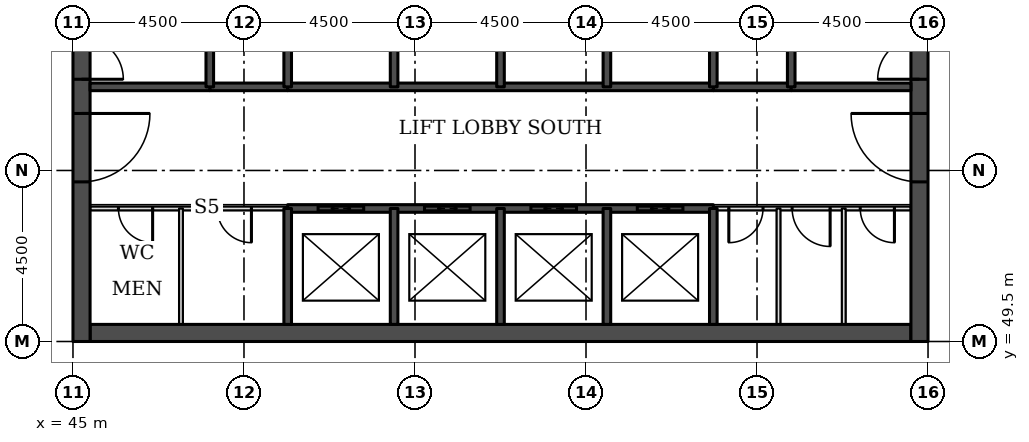
"""IFC4 building model, lengths in metres.
Left out: names, types, materials, properties, quantities, classifications, styles, units other than length and angle.
Written with IfcOpenShell. Run it as: python <this file> out.ifc"""

import sys

from ifc_helpers import new_model, si_unit, direction, frame, frame_2d, origin, place, context, subcontext, project, spatial, rectangle, extrude, element, fill, save


model = new_model("IFC4")
c1 = context("Model", 3, precision=1e-05, world=origin(), true_north=direction((0.0, 1.0)))
c2 = subcontext(c1, "Body", "Model", "MODEL_VIEW")
j1 = project(units=[si_unit("LENGTHUNIT", "METRE"), si_unit("PLANEANGLEUNIT", "RADIAN")], contexts=[c1])
p1 = place(None, origin())
s1 = spatial("IfcSite", under=j1, at=p1, CompositionType="ELEMENT")
p2 = place(p1, origin())
s2 = spatial("IfcBuilding", under=s1, at=p2, CompositionType="ELEMENT")
p3 = place(p2, frame((0.0, 0.0, 93.7)))
s3 = spatial("IfcBuildingStorey", under=s2, at=p3, CompositionType="ELEMENT", Elevation=93.7)
p4 = place(p3, frame((45.45, 49.725, 0.0), z_axis=(0.0, 0.0, 1.0), x_axis=(1.0, 0.0, 0.0)))
e1 = element("IfcWall", 1, at=p4, inside=s3, PredefinedType="SHEAR", context=c2, shape_type="SweptSolid", body=[
    extrude(rectangle(XDim=21.6, YDim=0.45, at=frame_2d((10.8, 0.0))), origin(), (0.0, 0.0, 1.0), 3.7),
])
p5 = place(p3, frame((45.225, 49.5, 0.0), z_axis=(0.0, 0.0, 1.0), x_axis=(0.0, 1.0, 0.0)))
e2 = element("IfcWall", 2, at=p5, inside=s3, PredefinedType="SHEAR", context=c2, shape_type="SweptSolid", body=[
    extrude(rectangle(XDim=22.5, YDim=0.45, at=frame_2d((11.25, 0.0))), origin(), (0.0, 0.0, 1.0), 3.7),
])
p6 = place(p5, frame((4.2, 0.0, 0.0)))
e3 = element("IfcOpeningElement", 3, at=p6, cuts=e2, PredefinedType="OPENING", context=c2, shape_type="SweptSolid", body=[
    extrude(rectangle(XDim=1.8, YDim=2.1, at=frame_2d((0.9, 1.05))), frame((0.0, 0.235, 0.0), z_axis=(0.0, -1.0, 0.0), x_axis=(1.0, 0.0, 0.0)), (0.0, 0.0, 1.0), 0.47),
])
p7 = place(p5, frame((6.9, 0.0, 0.0)))
e4 = element("IfcOpeningElement", 4, at=p7, cuts=e2, PredefinedType="OPENING", context=c2, shape_type="SweptSolid", body=[
    extrude(rectangle(XDim=1.1, YDim=2.1, at=frame_2d((0.55, 1.05))), frame((0.0, 0.235, 0.0), z_axis=(0.0, -1.0, 0.0), x_axis=(1.0, 0.0, 0.0)), (0.0, 0.0, 1.0), 0.47),
])
p8 = place(p5, frame((13.6, 0.0, 0.0)))
e5 = element("IfcOpeningElement", 5, at=p8, cuts=e2, PredefinedType="OPENING", context=c2, shape_type="SweptSolid", body=[
    extrude(rectangle(XDim=1.1, YDim=2.1, at=frame_2d((0.55, 1.05))), frame((0.0, 0.235, 0.0), z_axis=(0.0, -1.0, 0.0), x_axis=(1.0, 0.0, 0.0)), (0.0, 0.0, 1.0), 0.47),
])
p9 = place(p5, frame((16.5, 0.0, 0.0)))
e6 = element("IfcOpeningElement", 6, at=p9, cuts=e2, PredefinedType="OPENING", context=c2, shape_type="SweptSolid", body=[
    extrude(rectangle(XDim=1.8, YDim=2.1, at=frame_2d((0.9, 1.05))), frame((0.0, 0.235, 0.0), z_axis=(0.0, -1.0, 0.0), x_axis=(1.0, 0.0, 0.0)), (0.0, 0.0, 1.0), 0.47),
])
p10 = place(p3, frame((67.275, 49.5, 0.0), z_axis=(0.0, 0.0, 1.0), x_axis=(0.0, 1.0, 0.0)))
e7 = element("IfcWall", 7, at=p10, inside=s3, PredefinedType="SHEAR", context=c2, shape_type="SweptSolid", body=[
    extrude(rectangle(XDim=22.5, YDim=0.45, at=frame_2d((11.25, 0.0))), origin(), (0.0, 0.0, 1.0), 3.7),
])
p11 = place(p10, frame((4.2, 0.0, 0.0)))
e8 = element("IfcOpeningElement", 8, at=p11, cuts=e7, PredefinedType="OPENING", context=c2, shape_type="SweptSolid", body=[
    extrude(rectangle(XDim=1.8, YDim=2.1, at=frame_2d((0.9, 1.05))), frame((0.0, 0.235, 0.0), z_axis=(0.0, -1.0, 0.0), x_axis=(1.0, 0.0, 0.0)), (0.0, 0.0, 1.0), 0.47),
])
p12 = place(p10, frame((6.9, 0.0, 0.0)))
e9 = element("IfcOpeningElement", 9, at=p12, cuts=e7, PredefinedType="OPENING", context=c2, shape_type="SweptSolid", body=[
    extrude(rectangle(XDim=1.1, YDim=2.1, at=frame_2d((0.55, 1.05))), frame((0.0, 0.235, 0.0), z_axis=(0.0, -1.0, 0.0), x_axis=(1.0, 0.0, 0.0)), (0.0, 0.0, 1.0), 0.47),
])
p13 = place(p10, frame((13.6, 0.0, 0.0)))
e10 = element("IfcOpeningElement", 10, at=p13, cuts=e7, PredefinedType="OPENING", context=c2, shape_type="SweptSolid", body=[
    extrude(rectangle(XDim=1.1, YDim=2.1, at=frame_2d((0.55, 1.05))), frame((0.0, 0.235, 0.0), z_axis=(0.0, -1.0, 0.0), x_axis=(1.0, 0.0, 0.0)), (0.0, 0.0, 1.0), 0.47),
])
p14 = place(p10, frame((16.5, 0.0, 0.0)))
e11 = element("IfcOpeningElement", 11, at=p14, cuts=e7, PredefinedType="OPENING", context=c2, shape_type="SweptSolid", body=[
    extrude(rectangle(XDim=1.8, YDim=2.1, at=frame_2d((0.9, 1.05))), frame((0.0, 0.235, 0.0), z_axis=(0.0, -1.0, 0.0), x_axis=(1.0, 0.0, 0.0)), (0.0, 0.0, 1.0), 0.47),
])
p15 = place(p3, frame((45.45, 53.0, 0.0), z_axis=(0.0, 0.0, 1.0), x_axis=(1.0, 0.0, 0.0)))
e12 = element("IfcWall", 12, at=p15, inside=s3, PredefinedType="PARTITIONING", context=c2, shape_type="SweptSolid", body=[
    extrude(rectangle(XDim=5.2, YDim=0.1, at=frame_2d((2.6, 0.0))), origin(), (0.0, 0.0, 1.0), 3.55),
])
p16 = place(p15, frame((0.746, 0.0, 0.0)))
e13 = element("IfcOpeningElement", 13, at=p16, cuts=e12, PredefinedType="OPENING", context=c2, shape_type="SweptSolid", body=[
    extrude(rectangle(XDim=0.9, YDim=2.1, at=frame_2d((0.45, 1.05))), frame((0.0, 0.06, 0.0), z_axis=(0.0, -1.0, 0.0), x_axis=(1.0, 0.0, 0.0)), (0.0, 0.0, 1.0), 0.12),
])
p17 = place(p15, frame((3.346, 0.0, 0.0)))
e14 = element("IfcOpeningElement", 14, at=p17, cuts=e12, PredefinedType="OPENING", context=c2, shape_type="SweptSolid", body=[
    extrude(rectangle(XDim=0.9, YDim=2.1, at=frame_2d((0.45, 1.05))), frame((0.0, 0.06, 0.0), z_axis=(0.0, -1.0, 0.0), x_axis=(1.0, 0.0, 0.0)), (0.0, 0.0, 1.0), 0.12),
])
p18 = place(p3, frame((61.85, 53.0, 0.0), z_axis=(0.0, 0.0, 1.0), x_axis=(1.0, 0.0, 0.0)))
e15 = element("IfcWall", 15, at=p18, inside=s3, PredefinedType="PARTITIONING", context=c2, shape_type="SweptSolid", body=[
    extrude(rectangle(XDim=5.2, YDim=0.1, at=frame_2d((2.6, 0.0))), origin(), (0.0, 0.0, 1.0), 3.55),
])
p19 = place(p18, frame((3.866, 0.0, 0.0)))
e16 = element("IfcOpeningElement", 16, at=p19, cuts=e15, PredefinedType="OPENING", context=c2, shape_type="SweptSolid", body=[
    extrude(rectangle(XDim=0.9, YDim=2.1, at=frame_2d((0.45, 1.05))), frame((0.0, 0.06, 0.0), z_axis=(0.0, -1.0, 0.0), x_axis=(1.0, 0.0, 0.0)), (0.0, 0.0, 1.0), 0.12),
])
p20 = place(p18, frame((2.074, 0.0, 0.0)))
e17 = element("IfcOpeningElement", 17, at=p20, cuts=e15, PredefinedType="OPENING", context=c2, shape_type="SweptSolid", body=[
    extrude(rectangle(XDim=1.0, YDim=2.1, at=frame_2d((0.5, 1.05))), frame((0.0, 0.06, 0.0), z_axis=(0.0, -1.0, 0.0), x_axis=(1.0, 0.0, 0.0)), (0.0, 0.0, 1.0), 0.12),
])
p21 = place(p18, frame((0.408, 0.0, 0.0)))
e18 = element("IfcOpeningElement", 18, at=p21, cuts=e15, PredefinedType="OPENING", context=c2, shape_type="SweptSolid", body=[
    extrude(rectangle(XDim=0.9, YDim=2.1, at=frame_2d((0.45, 1.05))), frame((0.0, 0.06, 0.0), z_axis=(0.0, -1.0, 0.0), x_axis=(1.0, 0.0, 0.0)), (0.0, 0.0, 1.0), 0.12),
])
p22 = place(p3, frame((50.65, 53.0, 0.0), z_axis=(0.0, 0.0, 1.0), x_axis=(1.0, 0.0, 0.0)))
e19 = element("IfcWall", 19, at=p22, inside=s3, PredefinedType="SOLIDWALL", context=c2, shape_type="SweptSolid", body=[
    extrude(rectangle(XDim=11.2, YDim=0.2, at=frame_2d((5.6, 0.0))), origin(), (0.0, 0.0, 1.0), 3.55),
])
p23 = place(p22, frame((0.8, 0.0, 0.0)))
e20 = element("IfcOpeningElement", 20, at=p23, cuts=e19, PredefinedType="OPENING", context=c2, shape_type="SweptSolid", body=[
    extrude(rectangle(XDim=1.2, YDim=2.1, at=frame_2d((0.6, 1.05))), frame((0.0, 0.11, 0.0), z_axis=(0.0, -1.0, 0.0), x_axis=(1.0, 0.0, 0.0)), (0.0, 0.0, 1.0), 0.22),
])
p24 = place(p22, frame((3.6, 0.0, 0.0)))
e21 = element("IfcOpeningElement", 21, at=p24, cuts=e19, PredefinedType="OPENING", context=c2, shape_type="SweptSolid", body=[
    extrude(rectangle(XDim=1.2, YDim=2.1, at=frame_2d((0.6, 1.05))), frame((0.0, 0.11, 0.0), z_axis=(0.0, -1.0, 0.0), x_axis=(1.0, 0.0, 0.0)), (0.0, 0.0, 1.0), 0.22),
])
p25 = place(p22, frame((6.4, 0.0, 0.0)))
e22 = element("IfcOpeningElement", 22, at=p25, cuts=e19, PredefinedType="OPENING", context=c2, shape_type="SweptSolid", body=[
    extrude(rectangle(XDim=1.2, YDim=2.1, at=frame_2d((0.6, 1.05))), frame((0.0, 0.11, 0.0), z_axis=(0.0, -1.0, 0.0), x_axis=(1.0, 0.0, 0.0)), (0.0, 0.0, 1.0), 0.22),
])
p26 = place(p22, frame((9.2, 0.0, 0.0)))
e23 = element("IfcOpeningElement", 23, at=p26, cuts=e19, PredefinedType="OPENING", context=c2, shape_type="SweptSolid", body=[
    extrude(rectangle(XDim=1.2, YDim=2.1, at=frame_2d((0.6, 1.05))), frame((0.0, 0.11, 0.0), z_axis=(0.0, -1.0, 0.0), x_axis=(1.0, 0.0, 0.0)), (0.0, 0.0, 1.0), 0.22),
])
for number, where, z_axis, x_axis in (
    (24, (48.6, 56.2, 0.0), (0.0, 0.0, 1.0), (1.0, 0.0, 0.0)),
    (25, (61.85, 56.2, 0.0), (0.0, 0.0, 1.0), (1.0, 0.0, 0.0)),
):
    element("IfcWall", number, at=place(p3, frame(where, z_axis=z_axis, x_axis=x_axis)), inside=s3, PredefinedType="SOLIDWALL", context=c2, shape_type="SweptSolid", body=[
        extrude(rectangle(XDim=2.05, YDim=0.2, at=frame_2d((1.025, 0.0))), origin(), (0.0, 0.0, 1.0), 3.55),
    ])
p27 = place(p3, frame((45.45, 56.2, 0.0), z_axis=(0.0, 0.0, 1.0), x_axis=(1.0, 0.0, 0.0)))
e26 = element("IfcWall", 26, at=p27, inside=s3, PredefinedType="SOLIDWALL", context=c2, shape_type="SweptSolid", body=[
    extrude(rectangle(XDim=3.15, YDim=0.2, at=frame_2d((1.575, 0.0))), origin(), (0.0, 0.0, 1.0), 3.55),
])
p28 = place(p3, frame((50.65, 56.2, 0.0), z_axis=(0.0, 0.0, 1.0), x_axis=(1.0, 0.0, 0.0)))
e27 = element("IfcWall", 27, at=p28, inside=s3, PredefinedType="SOLIDWALL", context=c2, shape_type="SweptSolid", body=[
    extrude(rectangle(XDim=11.2, YDim=0.2, at=frame_2d((5.6, 0.0))), origin(), (0.0, 0.0, 1.0), 3.55),
])
p29 = place(p3, frame((63.9, 56.2, 0.0), z_axis=(0.0, 0.0, 1.0), x_axis=(1.0, 0.0, 0.0)))
e28 = element("IfcWall", 28, at=p29, inside=s3, PredefinedType="SOLIDWALL", context=c2, shape_type="SweptSolid", body=[
    extrude(rectangle(XDim=3.15, YDim=0.2, at=frame_2d((1.575, 0.0))), origin(), (0.0, 0.0, 1.0), 3.55),
])
p30 = place(p3, frame((47.842, 49.95, 0.0), z_axis=(0.0, 0.0, 1.0), x_axis=(0.0, 1.0, 0.0)))
e29 = element("IfcWall", 29, at=p30, inside=s3, PredefinedType="PARTITIONING", context=c2, shape_type="SweptSolid", body=[
    extrude(rectangle(XDim=3.05, YDim=0.1, at=frame_2d((1.525, 0.0))), origin(), (0.0, 0.0, 1.0), 3.55),
])
p31 = place(p3, frame((48.6, 56.2, 0.0), z_axis=(0.0, 0.0, 1.0), x_axis=(0.0, 1.0, 0.0)))
e30 = element("IfcWall", 30, at=p31, inside=s3, PredefinedType="SOLIDWALL", context=c2, shape_type="SweptSolid", body=[
    extrude(rectangle(XDim=5.8, YDim=0.2, at=frame_2d((2.9, 0.0))), origin(), (0.0, 0.0, 1.0), 3.55),
])
p32 = place(p3, frame((50.65, 49.95, 0.0), z_axis=(0.0, 0.0, 1.0), x_axis=(0.0, 1.0, 0.0)))
e31 = element("IfcWall", 31, at=p32, inside=s3, PredefinedType="SOLIDWALL", context=c2, shape_type="SweptSolid", body=[
    extrude(rectangle(XDim=3.05, YDim=0.2, at=frame_2d((1.525, 0.0))), origin(), (0.0, 0.0, 1.0), 3.55),
])
p33 = place(p3, frame((50.65, 56.2, 0.0), z_axis=(0.0, 0.0, 1.0), x_axis=(0.0, 1.0, 0.0)))
e32 = element("IfcWall", 32, at=p33, inside=s3, PredefinedType="SOLIDWALL", context=c2, shape_type="SweptSolid", body=[
    extrude(rectangle(XDim=2.8, YDim=0.2, at=frame_2d((1.4, 0.0))), origin(), (0.0, 0.0, 1.0), 3.55),
])
p34 = place(p3, frame((53.45, 49.95, 0.0), z_axis=(0.0, 0.0, 1.0), x_axis=(0.0, 1.0, 0.0)))
e33 = element("IfcWall", 33, at=p34, inside=s3, PredefinedType="SOLIDWALL", context=c2, shape_type="SweptSolid", body=[
    extrude(rectangle(XDim=3.05, YDim=0.2, at=frame_2d((1.525, 0.0))), origin(), (0.0, 0.0, 1.0), 3.55),
])
p35 = place(p3, frame((53.45, 56.2, 0.0), z_axis=(0.0, 0.0, 1.0), x_axis=(0.0, 1.0, 0.0)))
e34 = element("IfcWall", 34, at=p35, inside=s3, PredefinedType="SOLIDWALL", context=c2, shape_type="SweptSolid", body=[
    extrude(rectangle(XDim=2.8, YDim=0.2, at=frame_2d((1.4, 0.0))), origin(), (0.0, 0.0, 1.0), 3.55),
])
p36 = place(p3, frame((56.25, 49.95, 0.0), z_axis=(0.0, 0.0, 1.0), x_axis=(0.0, 1.0, 0.0)))
e35 = element("IfcWall", 35, at=p36, inside=s3, PredefinedType="SOLIDWALL", context=c2, shape_type="SweptSolid", body=[
    extrude(rectangle(XDim=3.05, YDim=0.2, at=frame_2d((1.525, 0.0))), origin(), (0.0, 0.0, 1.0), 3.55),
])
p37 = place(p3, frame((56.25, 56.2, 0.0), z_axis=(0.0, 0.0, 1.0), x_axis=(0.0, 1.0, 0.0)))
e36 = element("IfcWall", 36, at=p37, inside=s3, PredefinedType="SOLIDWALL", context=c2, shape_type="SweptSolid", body=[
    extrude(rectangle(XDim=2.8, YDim=0.2, at=frame_2d((1.4, 0.0))), origin(), (0.0, 0.0, 1.0), 3.55),
])
p38 = place(p3, frame((59.05, 49.95, 0.0), z_axis=(0.0, 0.0, 1.0), x_axis=(0.0, 1.0, 0.0)))
e37 = element("IfcWall", 37, at=p38, inside=s3, PredefinedType="SOLIDWALL", context=c2, shape_type="SweptSolid", body=[
    extrude(rectangle(XDim=3.05, YDim=0.2, at=frame_2d((1.525, 0.0))), origin(), (0.0, 0.0, 1.0), 3.55),
])
p39 = place(p3, frame((59.05, 56.2, 0.0), z_axis=(0.0, 0.0, 1.0), x_axis=(0.0, 1.0, 0.0)))
e38 = element("IfcWall", 38, at=p39, inside=s3, PredefinedType="SOLIDWALL", context=c2, shape_type="SweptSolid", body=[
    extrude(rectangle(XDim=2.8, YDim=0.2, at=frame_2d((1.4, 0.0))), origin(), (0.0, 0.0, 1.0), 3.55),
])
p40 = place(p3, frame((61.85, 49.95, 0.0), z_axis=(0.0, 0.0, 1.0), x_axis=(0.0, 1.0, 0.0)))
e39 = element("IfcWall", 39, at=p40, inside=s3, PredefinedType="SOLIDWALL", context=c2, shape_type="SweptSolid", body=[
    extrude(rectangle(XDim=3.05, YDim=0.2, at=frame_2d((1.525, 0.0))), origin(), (0.0, 0.0, 1.0), 3.55),
])
p41 = place(p3, frame((61.85, 56.2, 0.0), z_axis=(0.0, 0.0, 1.0), x_axis=(0.0, 1.0, 0.0)))
e40 = element("IfcWall", 40, at=p41, inside=s3, PredefinedType="SOLIDWALL", context=c2, shape_type="SweptSolid", body=[
    extrude(rectangle(XDim=2.8, YDim=0.2, at=frame_2d((1.4, 0.0))), origin(), (0.0, 0.0, 1.0), 3.55),
])
p42 = place(p3, frame((63.566, 49.95, 0.0), z_axis=(0.0, 0.0, 1.0), x_axis=(0.0, 1.0, 0.0)))
e41 = element("IfcWall", 41, at=p42, inside=s3, PredefinedType="PARTITIONING", context=c2, shape_type="SweptSolid", body=[
    extrude(rectangle(XDim=3.05, YDim=0.1, at=frame_2d((1.525, 0.0))), origin(), (0.0, 0.0, 1.0), 3.55),
])
p43 = place(p3, frame((63.9, 56.2, 0.0), z_axis=(0.0, 0.0, 1.0), x_axis=(0.0, 1.0, 0.0)))
e42 = element("IfcWall", 42, at=p43, inside=s3, PredefinedType="SOLIDWALL", context=c2, shape_type="SweptSolid", body=[
    extrude(rectangle(XDim=5.8, YDim=0.2, at=frame_2d((2.9, 0.0))), origin(), (0.0, 0.0, 1.0), 3.55),
])
p44 = place(p3, frame((65.282, 49.95, 0.0), z_axis=(0.0, 0.0, 1.0), x_axis=(0.0, 1.0, 0.0)))
e43 = element("IfcWall", 43, at=p44, inside=s3, PredefinedType="PARTITIONING", context=c2, shape_type="SweptSolid", body=[
    extrude(rectangle(XDim=3.05, YDim=0.1, at=frame_2d((1.525, 0.0))), origin(), (0.0, 0.0, 1.0), 3.55),
])
p45 = place(p23, origin())
e44 = element("IfcDoor", 44, at=p45, inside=s3, OperationType="DOUBLE_DOOR_SLIDING", PredefinedType="DOOR", context=c2, shape_type="SweptSolid", body=[
    extrude(rectangle(XDim=1.2, YDim=2.1, at=frame_2d((0.6, 1.05))), frame((0.0, 0.025, 0.0), z_axis=(0.0, -1.0, 0.0), x_axis=(1.0, 0.0, 0.0)), (0.0, 0.0, 1.0), 0.05),
])
fill(e20, e44)
p46 = place(p24, origin())
e45 = element("IfcDoor", 45, at=p46, inside=s3, OperationType="DOUBLE_DOOR_SLIDING", PredefinedType="DOOR", context=c2, shape_type="SweptSolid", body=[
    extrude(rectangle(XDim=1.2, YDim=2.1, at=frame_2d((0.6, 1.05))), frame((0.0, 0.025, 0.0), z_axis=(0.0, -1.0, 0.0), x_axis=(1.0, 0.0, 0.0)), (0.0, 0.0, 1.0), 0.05),
])
fill(e21, e45)
p47 = place(p25, origin())
e46 = element("IfcDoor", 46, at=p47, inside=s3, OperationType="DOUBLE_DOOR_SLIDING", PredefinedType="DOOR", context=c2, shape_type="SweptSolid", body=[
    extrude(rectangle(XDim=1.2, YDim=2.1, at=frame_2d((0.6, 1.05))), frame((0.0, 0.025, 0.0), z_axis=(0.0, -1.0, 0.0), x_axis=(1.0, 0.0, 0.0)), (0.0, 0.0, 1.0), 0.05),
])
fill(e22, e46)
p48 = place(p26, origin())
e47 = element("IfcDoor", 47, at=p48, inside=s3, OperationType="DOUBLE_DOOR_SLIDING", PredefinedType="DOOR", context=c2, shape_type="SweptSolid", body=[
    extrude(rectangle(XDim=1.2, YDim=2.1, at=frame_2d((0.6, 1.05))), frame((0.0, 0.025, 0.0), z_axis=(0.0, -1.0, 0.0), x_axis=(1.0, 0.0, 0.0)), (0.0, 0.0, 1.0), 0.05),
])
fill(e23, e47)
p49 = place(p6, frame((1.8, 0.0, 0.0), z_axis=(0.0, 0.0, 1.0), x_axis=(-1.0, 0.0, 0.0)))
e48 = element("IfcDoor", 48, at=p49, inside=s3, OperationType="SINGLE_SWING_LEFT", PredefinedType="DOOR", context=c2, shape_type="SweptSolid", body=[
    extrude(rectangle(XDim=1.8, YDim=2.1, at=frame_2d((0.9, 1.05))), frame((0.0, 0.025, 0.0), z_axis=(0.0, -1.0, 0.0), x_axis=(1.0, 0.0, 0.0)), (0.0, 0.0, 1.0), 0.05),
])
fill(e3, e48)
p50 = place(p7, frame((1.1, 0.0, 0.0), z_axis=(0.0, 0.0, 1.0), x_axis=(-1.0, 0.0, 0.0)))
e49 = element("IfcDoor", 49, at=p50, inside=s3, OperationType="SINGLE_SWING_RIGHT", PredefinedType="DOOR", context=c2, shape_type="SweptSolid", body=[
    extrude(rectangle(XDim=1.1, YDim=2.1, at=frame_2d((0.55, 1.05))), frame((0.0, 0.025, 0.0), z_axis=(0.0, -1.0, 0.0), x_axis=(1.0, 0.0, 0.0)), (0.0, 0.0, 1.0), 0.05),
])
fill(e4, e49)
p51 = place(p11, origin())
e50 = element("IfcDoor", 50, at=p51, inside=s3, OperationType="SINGLE_SWING_RIGHT", PredefinedType="DOOR", context=c2, shape_type="SweptSolid", body=[
    extrude(rectangle(XDim=1.8, YDim=2.1, at=frame_2d((0.9, 1.05))), frame((0.0, 0.025, 0.0), z_axis=(0.0, -1.0, 0.0), x_axis=(1.0, 0.0, 0.0)), (0.0, 0.0, 1.0), 0.05),
])
fill(e8, e50)
p52 = place(p12, origin())
e51 = element("IfcDoor", 51, at=p52, inside=s3, OperationType="SINGLE_SWING_LEFT", PredefinedType="DOOR", context=c2, shape_type="SweptSolid", body=[
    extrude(rectangle(XDim=1.1, YDim=2.1, at=frame_2d((0.55, 1.05))), frame((0.0, 0.025, 0.0), z_axis=(0.0, -1.0, 0.0), x_axis=(1.0, 0.0, 0.0)), (0.0, 0.0, 1.0), 0.05),
])
fill(e9, e51)
p53 = place(p19, frame((0.9, 0.0, 0.0), z_axis=(0.0, 0.0, 1.0), x_axis=(-1.0, 0.0, 0.0)))
e52 = element("IfcDoor", 52, at=p53, inside=s3, OperationType="SINGLE_SWING_LEFT", PredefinedType="DOOR", context=c2, shape_type="SweptSolid", body=[
    extrude(rectangle(XDim=0.9, YDim=2.1, at=frame_2d((0.45, 1.05))), frame((0.0, 0.025, 0.0), z_axis=(0.0, -1.0, 0.0), x_axis=(1.0, 0.0, 0.0)), (0.0, 0.0, 1.0), 0.05),
])
fill(e16, e52)
p54 = place(p20, frame((1.0, 0.0, 0.0), z_axis=(0.0, 0.0, 1.0), x_axis=(-1.0, 0.0, 0.0)))
e53 = element("IfcDoor", 53, at=p54, inside=s3, OperationType="SINGLE_SWING_LEFT", PredefinedType="DOOR", context=c2, shape_type="SweptSolid", body=[
    extrude(rectangle(XDim=1.0, YDim=2.1, at=frame_2d((0.5, 1.05))), frame((0.0, 0.025, 0.0), z_axis=(0.0, -1.0, 0.0), x_axis=(1.0, 0.0, 0.0)), (0.0, 0.0, 1.0), 0.05),
])
fill(e17, e53)
p55 = place(p21, frame((0.9, 0.0, 0.0), z_axis=(0.0, 0.0, 1.0), x_axis=(-1.0, 0.0, 0.0)))
e54 = element("IfcDoor", 54, at=p55, inside=s3, OperationType="SINGLE_SWING_RIGHT", PredefinedType="DOOR", context=c2, shape_type="SweptSolid", body=[
    extrude(rectangle(XDim=0.9, YDim=2.1, at=frame_2d((0.45, 1.05))), frame((0.0, 0.025, 0.0), z_axis=(0.0, -1.0, 0.0), x_axis=(1.0, 0.0, 0.0)), (0.0, 0.0, 1.0), 0.05),
])
fill(e18, e54)
p56 = place(p16, frame((0.9, 0.0, 0.0), z_axis=(0.0, 0.0, 1.0), x_axis=(-1.0, 0.0, 0.0)))
e55 = element("IfcDoor", 55, at=p56, inside=s3, OperationType="SINGLE_SWING_LEFT", PredefinedType="DOOR", context=c2, shape_type="SweptSolid", body=[
    extrude(rectangle(XDim=0.9, YDim=2.1, at=frame_2d((0.45, 1.05))), frame((0.0, 0.025, 0.0), z_axis=(0.0, -1.0, 0.0), x_axis=(1.0, 0.0, 0.0)), (0.0, 0.0, 1.0), 0.05),
])
fill(e13, e55)
p57 = place(p17, frame((0.9, 0.0, 0.0), z_axis=(0.0, 0.0, 1.0), x_axis=(-1.0, 0.0, 0.0)))
e56 = element("IfcDoor", 56, at=p57, inside=s3, OperationType="SINGLE_SWING_LEFT", PredefinedType="DOOR", context=c2, shape_type="SweptSolid", body=[
    extrude(rectangle(XDim=0.9, YDim=2.1, at=frame_2d((0.45, 1.05))), frame((0.0, 0.025, 0.0), z_axis=(0.0, -1.0, 0.0), x_axis=(1.0, 0.0, 0.0)), (0.0, 0.0, 1.0), 0.05),
])
fill(e14, e56)
save(model, sys.argv[1])
